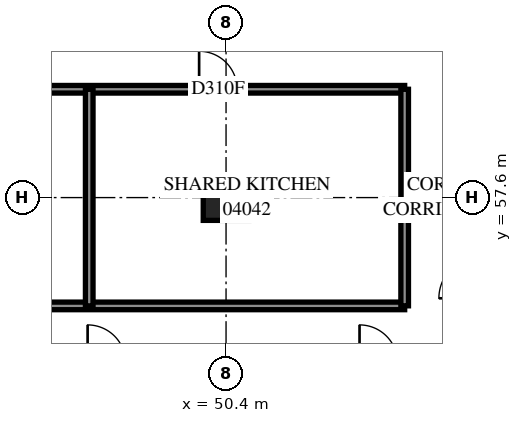
"""IFC4 building model, lengths in metres.
Left out: names, types, materials, properties, quantities, classifications, styles, units other than length and angle.
Written with IfcOpenShell. Run it as: python <this file> out.ifc"""

import sys

from ifc_helpers import new_model, si_unit, direction, frame, frame_2d, origin, origin_2d, place, context, subcontext, project, spatial, rectangle, extrude, element, fill, save


model = new_model("IFC4")
c1 = context("Model", 3, precision=1e-05, world=origin(), true_north=direction((0.0, 1.0)))
c2 = subcontext(c1, "Body", "Model", "MODEL_VIEW")
j1 = project(units=[si_unit("LENGTHUNIT", "METRE"), si_unit("PLANEANGLEUNIT", "RADIAN")], contexts=[c1])
p1 = place(None, origin())
s1 = spatial("IfcSite", under=j1, at=p1, CompositionType="ELEMENT")
p2 = place(p1, origin())
s2 = spatial("IfcBuilding", under=s1, at=p2, CompositionType="ELEMENT")
p3 = place(p2, frame((0.0, 0.0, 18.6)))
s3 = spatial("IfcBuildingStorey", under=s2, at=p3, CompositionType="ELEMENT", Elevation=18.6)
p4 = place(p3, frame((50.4, 57.6, 0.0), z_axis=(0.0, 0.0, 1.0), x_axis=(1.0, 0.0, 0.0)))
e1 = element("IfcColumn", 1, at=p4, inside=s3, PredefinedType="COLUMN", context=c2, shape_type="SweptSolid", body=[
    extrude(rectangle(XDim=1.2, YDim=1.2, at=origin_2d()), origin(), (0.0, 0.0, 1.0), 3.8),
])
p5 = place(p3, frame((0.002, 60.45, 0.0), z_axis=(0.0, 0.0, 1.0), x_axis=(1.0, 0.0, 0.0)))
e2 = element("IfcWall", 2, at=p5, inside=s3, PredefinedType="PARTITIONING", context=c2, shape_type="SweptSolid", body=[
    extrude(rectangle(XDim=55.098, YDim=0.2, at=frame_2d((27.549, 0.0))), origin(), (0.0, 0.0, 1.0), 3.8),
])
p6 = place(p5, frame((49.69, 0.0, 0.0)))
e3 = element("IfcOpeningElement", 3, at=p6, cuts=e2, PredefinedType="OPENING", context=c2, shape_type="SweptSolid", body=[
    extrude(rectangle(XDim=1.0, YDim=2.1, at=frame_2d((0.5, 1.05))), frame((0.0, 0.11, 0.0), z_axis=(0.0, -1.0, 0.0), x_axis=(1.0, 0.0, 0.0)), (0.0, 0.0, 1.0), 0.22),
])
p7 = place(p5, frame((3.897, 0.0, 0.0)))
e4 = element("IfcOpeningElement", 4, at=p7, cuts=e2, PredefinedType="OPENING", context=c2, shape_type="SweptSolid", body=[
    extrude(rectangle(XDim=1.0, YDim=2.1, at=frame_2d((0.5, 1.05))), frame((0.0, 0.11, 0.0), z_axis=(0.0, -1.0, 0.0), x_axis=(1.0, 0.0, 0.0)), (0.0, 0.0, 1.0), 0.22),
])
p8 = place(p3, frame((6.0, 54.75, 0.0), z_axis=(0.0, 0.0, 1.0), x_axis=(1.0, 0.0, 0.0)))
e5 = element("IfcWall", 5, at=p8, inside=s3, PredefinedType="PARTITIONING", context=c2, shape_type="SweptSolid", body=[
    extrude(rectangle(XDim=49.1, YDim=0.2, at=frame_2d((24.55, 0.0))), origin(), (0.0, 0.0, 1.0), 3.8),
])
p9 = place(p8, frame((6.284, 0.0, 0.0)))
e6 = element("IfcOpeningElement", 6, at=p9, cuts=e5, PredefinedType="OPENING", context=c2, shape_type="SweptSolid", body=[
    extrude(rectangle(XDim=1.0, YDim=2.1, at=frame_2d((0.5, 1.05))), frame((0.0, 0.11, 0.0), z_axis=(0.0, -1.0, 0.0), x_axis=(1.0, 0.0, 0.0)), (0.0, 0.0, 1.0), 0.22),
])
p10 = place(p8, frame((14.374, 0.0, 0.0)))
e7 = element("IfcOpeningElement", 7, at=p10, cuts=e5, PredefinedType="OPENING", context=c2, shape_type="SweptSolid", body=[
    extrude(rectangle(XDim=1.0, YDim=2.1, at=frame_2d((0.5, 1.05))), frame((0.0, 0.11, 0.0), z_axis=(0.0, -1.0, 0.0), x_axis=(1.0, 0.0, 0.0)), (0.0, 0.0, 1.0), 0.22),
])
p11 = place(p8, frame((19.725, 0.0, 0.0)))
e8 = element("IfcOpeningElement", 8, at=p11, cuts=e5, PredefinedType="OPENING", context=c2, shape_type="SweptSolid", body=[
    extrude(rectangle(XDim=1.0, YDim=2.1, at=frame_2d((0.5, 1.05))), frame((0.0, 0.11, 0.0), z_axis=(0.0, -1.0, 0.0), x_axis=(1.0, 0.0, 0.0)), (0.0, 0.0, 1.0), 0.22),
])
p12 = place(p8, frame((28.183, 0.0, 0.0)))
e9 = element("IfcOpeningElement", 9, at=p12, cuts=e5, PredefinedType="OPENING", context=c2, shape_type="SweptSolid", body=[
    extrude(rectangle(XDim=1.0, YDim=2.1, at=frame_2d((0.5, 1.05))), frame((0.0, 0.11, 0.0), z_axis=(0.0, -1.0, 0.0), x_axis=(1.0, 0.0, 0.0)), (0.0, 0.0, 1.0), 0.22),
])
p13 = place(p8, frame((35.974, 0.0, 0.0)))
e10 = element("IfcOpeningElement", 10, at=p13, cuts=e5, PredefinedType="OPENING", context=c2, shape_type="SweptSolid", body=[
    extrude(rectangle(XDim=1.0, YDim=2.1, at=frame_2d((0.5, 1.05))), frame((0.0, 0.11, 0.0), z_axis=(0.0, -1.0, 0.0), x_axis=(1.0, 0.0, 0.0)), (0.0, 0.0, 1.0), 0.22),
])
p14 = place(p3, frame((46.8, 54.75, 0.0), z_axis=(0.0, 0.0, 1.0), x_axis=(0.0, 1.0, 0.0)))
e11 = element("IfcWall", 11, at=p14, inside=s3, PredefinedType="PARTITIONING", context=c2, shape_type="SweptSolid", body=[
    extrude(rectangle(XDim=5.7, YDim=0.2, at=frame_2d((2.85, 0.0))), origin(), (0.0, 0.0, 1.0), 3.8),
])
p15 = place(p3, frame((55.1, 54.752, 0.0), z_axis=(0.0, 0.0, 1.0), x_axis=(0.0, 1.0, 0.0)))
e12 = element("IfcWall", 12, at=p15, inside=s3, PredefinedType="PARTITIONING", context=c2, shape_type="SweptSolid", body=[
    extrude(rectangle(XDim=5.698, YDim=0.2, at=frame_2d((2.849, 0.0))), origin(), (0.0, 0.0, 1.0), 3.8),
])
p16 = place(p6, origin())
e13 = element("IfcDoor", 13, at=p16, inside=s3, OperationType="SINGLE_SWING_RIGHT", PredefinedType="DOOR", context=c2, shape_type="SweptSolid", body=[
    extrude(rectangle(XDim=1.0, YDim=2.1, at=frame_2d((0.5, 1.05))), frame((0.0, 0.025, 0.0), z_axis=(0.0, -1.0, 0.0), x_axis=(1.0, 0.0, 0.0)), (0.0, 0.0, 1.0), 0.05),
])
fill(e3, e13)
save(model, sys.argv[1])
